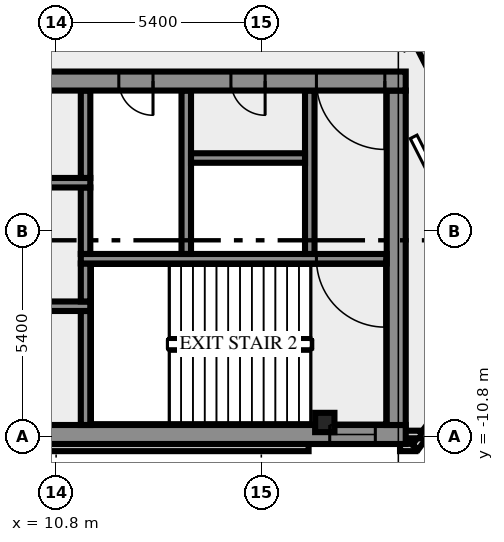
"""IFC4 building model, lengths in metres.
Left out: names, types, materials, properties, quantities, classifications, styles, units other than length and angle.
Written with IfcOpenShell. Run it as: python <this file> out.ifc"""

import sys

from ifc_helpers import new_model, si_unit, direction, frame, frame_2d, origin, origin_2d, place, context, subcontext, project, spatial, rectangle, hollow_rectangle, extrude, element, fill, save


model = new_model("IFC4")
c1 = context("Model", 3, precision=1e-05, world=origin(), true_north=direction((0.0, 1.0)))
c2 = subcontext(c1, "Body", "Model", "MODEL_VIEW")
j1 = project(units=[si_unit("LENGTHUNIT", "METRE"), si_unit("PLANEANGLEUNIT", "RADIAN")], contexts=[c1])
p1 = place(None, origin())
s1 = spatial("IfcSite", under=j1, at=p1, CompositionType="ELEMENT")
p2 = place(p1, origin())
s2 = spatial("IfcBuilding", under=s1, at=p2, CompositionType="ELEMENT")
p3 = place(p2, frame((0.0, 0.0, 355.0)))
s3 = spatial("IfcBuildingStorey", under=s2, at=p3, CompositionType="ELEMENT", Elevation=355.0)
p4 = place(p3, frame((17.87, -10.434, 0.0), z_axis=(0.0, 0.0, 1.0), x_axis=(1.0, 0.0, 0.0)))
e1 = element("IfcColumn", 1, at=p4, inside=s3, PredefinedType="COLUMN", context=c2, shape_type="SweptSolid", body=[
    extrude(hollow_rectangle(XDim=0.508, YDim=0.508, WallThickness=0.016, at=origin_2d()), origin(), (0.0, 0.0, 1.0), 7.55),
])
p5 = place(p3, frame((-17.444, -11.088, 0.0), z_axis=(0.0, 0.0, 1.0), x_axis=(1.0, 0.0, 0.0)))
e2 = element("IfcWall", 2, at=p5, inside=s3, PredefinedType="SOLIDWALL", context=c2, shape_type="SweptSolid", body=[
    extrude(rectangle(XDim=34.888, YDim=0.2, at=frame_2d((17.444, 0.0))), origin(), (0.0, 0.0, 1.0), 7.55),
])
p6 = place(p3, frame((19.85, -11.088, 0.0), z_axis=(0.0, 0.0, 1.0), x_axis=(1.0, 0.0, 0.0)))
e3 = element("IfcWall", 3, at=p6, inside=s3, PredefinedType="SOLIDWALL", context=c2, shape_type="SweptSolid", body=[
    extrude(rectangle(XDim=0.406, YDim=0.2, at=frame_2d((0.203, 0.0))), origin(), (0.0, 0.0, 1.0), 7.55),
])
p7 = place(p3, frame((20.253, -11.083, 0.0), z_axis=(0.0, 0.0, 1.0), x_axis=(0.587766567315, 0.809030569476, 0.0)))
e4 = element("IfcWall", 4, at=p7, inside=s3, PredefinedType="SOLIDWALL", context=c2, shape_type="SweptSolid", body=[
    extrude(rectangle(XDim=2.688, YDim=0.2, at=frame_2d((1.344, 0.0))), origin(), (0.0, 0.0, 1.0), 7.55),
])
p8 = place(p3, frame((20.244, -0.258, 0.0), z_axis=(0.0, 0.0, 1.0), x_axis=(0.453964632037, -0.891019703968, 0.0)))
e5 = element("IfcWall", 5, at=p8, inside=s3, PredefinedType="SOLIDWALL", context=c2, shape_type="SweptSolid", body=[
    extrude(rectangle(XDim=2.354, YDim=0.2, at=frame_2d((1.177, 0.0))), origin(), (0.0, 0.0, 1.0), 7.55),
])
p9 = place(p8, frame((0.843, 0.0, 0.0)))
e6 = element("IfcOpeningElement", 6, at=p9, cuts=e5, PredefinedType="OPENING", context=c2, shape_type="SweptSolid", body=[
    extrude(rectangle(XDim=0.9, YDim=2.1, at=frame_2d((0.45, 1.05))), frame((0.0, 0.11, 0.0), z_axis=(0.0, -1.0, 0.0), x_axis=(1.0, 0.0, 0.0)), (0.0, 0.0, 1.0), 0.22),
])
p10 = place(p3, frame((19.98, -10.75, 0.0), z_axis=(0.0, 0.0, 1.0), x_axis=(1.0, 0.0, 0.0)))
e7 = element("IfcWall", 7, at=p10, inside=s3, PredefinedType="SOLIDWALL", context=c2, shape_type="SweptSolid", body=[
    extrude(rectangle(XDim=0.417, YDim=0.2, at=frame_2d((0.208, 0.0))), origin(), (0.0, 0.0, 1.0), 7.55),
])
p11 = place(p3, frame((-20.0, -10.75, 0.0), z_axis=(0.0, 0.0, 1.0), x_axis=(1.0, 0.0, 0.0)))
e8 = element("IfcWall", 8, at=p11, inside=s3, PredefinedType="SHEAR", context=c2, shape_type="SweptSolid", body=[
    extrude(rectangle(XDim=40.0, YDim=0.5, at=frame_2d((20.0, 0.0))), origin(), (0.0, 0.0, 1.0), 7.55),
])
p12 = place(p11, frame((0.8, 0.0, 1.0)))
e9 = element("IfcOpeningElement", 9, at=p12, cuts=e8, PredefinedType="OPENING", context=c2, shape_type="SweptSolid", body=[
    extrude(rectangle(XDim=1.2, YDim=1.2, at=frame_2d((0.6, 0.6))), frame((0.0, 0.26, 0.0), z_axis=(0.0, -1.0, 0.0), x_axis=(1.0, 0.0, 0.0)), (0.0, 0.0, 1.0), 0.52),
])
p13 = place(p11, frame((38.0, 0.0, 1.0)))
e10 = element("IfcOpeningElement", 10, at=p13, cuts=e8, PredefinedType="OPENING", context=c2, shape_type="SweptSolid", body=[
    extrude(rectangle(XDim=1.2, YDim=1.2, at=frame_2d((0.6, 0.6))), frame((0.0, 0.26, 0.0), z_axis=(0.0, -1.0, 0.0), x_axis=(1.0, 0.0, 0.0)), (0.0, 0.0, 1.0), 0.52),
])
p14 = place(p3, frame((11.575, -10.5, 0.0), z_axis=(0.0, 0.0, 1.0), x_axis=(0.0, 1.0, 0.0)))
e11 = element("IfcWall", 11, at=p14, inside=s3, PredefinedType="SHEAR", context=c2, shape_type="SweptSolid", body=[
    extrude(rectangle(XDim=3.0, YDim=0.25, at=frame_2d((1.5, 0.0))), origin(), (0.0, 0.0, 1.0), 7.55),
])
p15 = place(p3, frame((19.75, -10.5, 0.0), z_axis=(0.0, 0.0, 1.0), x_axis=(0.0, 1.0, 0.0)))
e12 = element("IfcWall", 12, at=p15, inside=s3, PredefinedType="SHEAR", context=c2, shape_type="SweptSolid", body=[
    extrude(rectangle(XDim=8.8, YDim=0.5, at=frame_2d((4.4, 0.0))), origin(), (0.0, 0.0, 1.0), 7.55),
])
p16 = place(p3, frame((11.7, -7.375, 0.0), z_axis=(0.0, 0.0, 1.0), x_axis=(-1.0, 0.0, 0.0)))
e13 = element("IfcWall", 13, at=p16, inside=s3, PredefinedType="SHEAR", context=c2, shape_type="SweptSolid", body=[
    extrude(rectangle(XDim=23.4, YDim=0.25, at=frame_2d((11.7, 0.0))), origin(), (0.0, 0.0, 1.0), 7.55),
])
p17 = place(p16, frame((14.2, 0.0, 0.0)))
e14 = element("IfcOpeningElement", 14, at=p17, cuts=e13, PredefinedType="OPENING", context=c2, shape_type="SweptSolid", body=[
    extrude(rectangle(XDim=0.9, YDim=2.1, at=frame_2d((0.45, 1.05))), frame((0.0, 0.135, 0.0), z_axis=(0.0, -1.0, 0.0), x_axis=(1.0, 0.0, 0.0)), (0.0, 0.0, 1.0), 0.27),
])
p18 = place(p16, frame((12.35, 0.0, 0.0)))
e15 = element("IfcOpeningElement", 15, at=p18, cuts=e13, PredefinedType="OPENING", context=c2, shape_type="SweptSolid", body=[
    extrude(rectangle(XDim=0.9, YDim=2.1, at=frame_2d((0.45, 1.05))), frame((0.0, 0.135, 0.0), z_axis=(0.0, -1.0, 0.0), x_axis=(1.0, 0.0, 0.0)), (0.0, 0.0, 1.0), 0.27),
])
p19 = place(p16, frame((10.65, 0.0, 0.0)))
e16 = element("IfcOpeningElement", 16, at=p19, cuts=e13, PredefinedType="OPENING", context=c2, shape_type="SweptSolid", body=[
    extrude(rectangle(XDim=0.9, YDim=2.1, at=frame_2d((0.45, 1.05))), frame((0.0, 0.135, 0.0), z_axis=(0.0, -1.0, 0.0), x_axis=(1.0, 0.0, 0.0)), (0.0, 0.0, 1.0), 0.27),
])
p20 = place(p16, frame((7.6, 0.0, 0.0)))
e17 = element("IfcOpeningElement", 17, at=p20, cuts=e13, PredefinedType="OPENING", context=c2, shape_type="SweptSolid", body=[
    extrude(rectangle(XDim=0.9, YDim=2.1, at=frame_2d((0.45, 1.05))), frame((0.0, 0.135, 0.0), z_axis=(0.0, -1.0, 0.0), x_axis=(1.0, 0.0, 0.0)), (0.0, 0.0, 1.0), 0.27),
])
p21 = place(p16, frame((2.338, 0.0, 0.0)))
e18 = element("IfcOpeningElement", 18, at=p21, cuts=e13, PredefinedType="OPENING", context=c2, shape_type="SweptSolid", body=[
    extrude(rectangle(XDim=0.9, YDim=2.1, at=frame_2d((0.45, 1.05))), frame((0.0, 0.135, 0.0), z_axis=(0.0, -1.0, 0.0), x_axis=(1.0, 0.0, 0.0)), (0.0, 0.0, 1.0), 0.27),
])
p22 = place(p3, frame((11.575, -7.25, 0.0), z_axis=(0.0, 0.0, 1.0), x_axis=(0.0, 1.0, 0.0)))
e19 = element("IfcWall", 19, at=p22, inside=s3, PredefinedType="SHEAR", context=c2, shape_type="SweptSolid", body=[
    extrude(rectangle(XDim=1.0, YDim=0.25, at=frame_2d((0.5, 0.0))), origin(), (0.0, 0.0, 1.0), 7.55),
])
p23 = place(p3, frame((19.5, -6.125, 0.0), z_axis=(0.0, 0.0, 1.0), x_axis=(-1.0, 0.0, 0.0)))
e20 = element("IfcWall", 20, at=p23, inside=s3, PredefinedType="SHEAR", context=c2, shape_type="SweptSolid", body=[
    extrude(rectangle(XDim=8.05, YDim=0.25, at=frame_2d((4.025, 0.0))), origin(), (0.0, 0.0, 1.0), 7.55),
])
p24 = place(p23, frame((0.05, 0.0, 0.0)))
e21 = element("IfcOpeningElement", 21, at=p24, cuts=e20, PredefinedType="OPENING", context=c2, shape_type="SweptSolid", body=[
    extrude(rectangle(XDim=1.8, YDim=2.1, at=frame_2d((0.9, 1.05))), frame((0.0, 0.135, 0.0), z_axis=(0.0, -1.0, 0.0), x_axis=(1.0, 0.0, 0.0)), (0.0, 0.0, 1.0), 0.27),
])
p25 = place(p3, frame((11.575, -6.0, 0.0), z_axis=(0.0, 0.0, 1.0), x_axis=(0.0, 1.0, 0.0)))
e22 = element("IfcWall", 22, at=p25, inside=s3, PredefinedType="SHEAR", context=c2, shape_type="SweptSolid", body=[
    extrude(rectangle(XDim=1.75, YDim=0.25, at=frame_2d((0.875, 0.0))), origin(), (0.0, 0.0, 1.0), 7.55),
])
for number, where, z_axis, x_axis in (
    (23, (14.225, -6.0, 0.0), (0.0, 0.0, 1.0), (0.0, 1.0, 0.0)),
    (24, (17.475, -6.0, 0.0), (0.0, 0.0, 1.0), (0.0, 1.0, 0.0)),
):
    element("IfcWall", number, at=place(p3, frame(where, z_axis=z_axis, x_axis=x_axis)), inside=s3, PredefinedType="SHEAR", context=c2, shape_type="SweptSolid", body=[
        extrude(rectangle(XDim=4.3, YDim=0.25, at=frame_2d((2.15, 0.0))), origin(), (0.0, 0.0, 1.0), 7.55),
    ])
p26 = place(p3, frame((1.45, -4.125, 0.0), z_axis=(0.0, 0.0, 1.0), x_axis=(1.0, 0.0, 0.0)))
e25 = element("IfcWall", 25, at=p26, inside=s3, PredefinedType="SHEAR", context=c2, shape_type="SweptSolid", body=[
    extrude(rectangle(XDim=10.25, YDim=0.25, at=frame_2d((5.125, 0.0))), origin(), (0.0, 0.0, 1.0), 7.55),
])
p27 = place(p26, frame((0.7, 0.0, 0.0)))
e26 = element("IfcOpeningElement", 26, at=p27, cuts=e25, PredefinedType="OPENING", context=c2, shape_type="SweptSolid", body=[
    extrude(rectangle(XDim=1.3, YDim=2.1, at=frame_2d((0.65, 1.05))), frame((0.0, 0.135, 0.0), z_axis=(0.0, -1.0, 0.0), x_axis=(1.0, 0.0, 0.0)), (0.0, 0.0, 1.0), 0.27),
])
p28 = place(p3, frame((11.575, -4.0, 0.0), z_axis=(0.0, 0.0, 1.0), x_axis=(0.0, 1.0, 0.0)))
e27 = element("IfcWall", 27, at=p28, inside=s3, PredefinedType="SHEAR", context=c2, shape_type="SweptSolid", body=[
    extrude(rectangle(XDim=2.3, YDim=0.25, at=frame_2d((1.15, 0.0))), origin(), (0.0, 0.0, 1.0), 7.55),
])
p29 = place(p3, frame((14.35, -3.475, 0.0), z_axis=(0.0, 0.0, 1.0), x_axis=(1.0, 0.0, 0.0)))
e28 = element("IfcWall", 28, at=p29, inside=s3, PredefinedType="SHEAR", context=c2, shape_type="SweptSolid", body=[
    extrude(rectangle(XDim=3.0, YDim=0.25, at=frame_2d((1.5, 0.0))), origin(), (0.0, 0.0, 1.0), 7.55),
])
p30 = place(p3, frame((20.0, -1.45, 0.0), z_axis=(0.0, 0.0, 1.0), x_axis=(-1.0, 0.0, 0.0)))
e29 = element("IfcWall", 29, at=p30, inside=s3, PredefinedType="SHEAR", context=c2, shape_type="SweptSolid", body=[
    extrude(rectangle(XDim=40.0, YDim=0.5, at=frame_2d((20.0, 0.0))), origin(), (0.0, 0.0, 1.0), 7.55),
])
p31 = place(p30, frame((37.65, 0.0, 0.0)))
e30 = element("IfcOpeningElement", 30, at=p31, cuts=e29, PredefinedType="OPENING", context=c2, shape_type="SweptSolid", body=[
    extrude(rectangle(XDim=1.8, YDim=2.1, at=frame_2d((0.9, 1.05))), frame((0.0, 0.26, 0.0), z_axis=(0.0, -1.0, 0.0), x_axis=(1.0, 0.0, 0.0)), (0.0, 0.0, 1.0), 0.52),
])
p32 = place(p30, frame((36.238, 0.0, 0.0)))
e31 = element("IfcOpeningElement", 31, at=p32, cuts=e29, PredefinedType="OPENING", context=c2, shape_type="SweptSolid", body=[
    extrude(rectangle(XDim=0.8, YDim=2.1, at=frame_2d((0.4, 1.05))), frame((0.0, 0.26, 0.0), z_axis=(0.0, -1.0, 0.0), x_axis=(1.0, 0.0, 0.0)), (0.0, 0.0, 1.0), 0.52),
])
p33 = place(p30, frame((34.663, 0.0, 0.0)))
e32 = element("IfcOpeningElement", 32, at=p33, cuts=e29, PredefinedType="OPENING", context=c2, shape_type="SweptSolid", body=[
    extrude(rectangle(XDim=0.8, YDim=2.1, at=frame_2d((0.4, 1.05))), frame((0.0, 0.26, 0.0), z_axis=(0.0, -1.0, 0.0), x_axis=(1.0, 0.0, 0.0)), (0.0, 0.0, 1.0), 0.52),
])
p34 = place(p30, frame((32.45, 0.0, 0.0)))
e33 = element("IfcOpeningElement", 33, at=p34, cuts=e29, PredefinedType="OPENING", context=c2, shape_type="SweptSolid", body=[
    extrude(rectangle(XDim=0.9, YDim=2.1, at=frame_2d((0.45, 1.05))), frame((0.0, 0.26, 0.0), z_axis=(0.0, -1.0, 0.0), x_axis=(1.0, 0.0, 0.0)), (0.0, 0.0, 1.0), 0.52),
])
p35 = place(p30, frame((20.25, 0.0, 0.0)))
e34 = element("IfcOpeningElement", 34, at=p35, cuts=e29, PredefinedType="OPENING", context=c2, shape_type="SweptSolid", body=[
    extrude(rectangle(XDim=2.0, YDim=2.1, at=frame_2d((1.0, 1.05))), frame((0.0, 0.26, 0.0), z_axis=(0.0, -1.0, 0.0), x_axis=(1.0, 0.0, 0.0)), (0.0, 0.0, 1.0), 0.52),
])
p36 = place(p30, frame((14.413, 0.0, 0.0)))
e35 = element("IfcOpeningElement", 35, at=p36, cuts=e29, PredefinedType="OPENING", context=c2, shape_type="SweptSolid", body=[
    extrude(rectangle(XDim=0.9, YDim=2.1, at=frame_2d((0.45, 1.05))), frame((0.0, 0.26, 0.0), z_axis=(0.0, -1.0, 0.0), x_axis=(1.0, 0.0, 0.0)), (0.0, 0.0, 1.0), 0.52),
])
p37 = place(p30, frame((12.05, 0.0, 0.0)))
e36 = element("IfcOpeningElement", 36, at=p37, cuts=e29, PredefinedType="OPENING", context=c2, shape_type="SweptSolid", body=[
    extrude(rectangle(XDim=0.9, YDim=2.1, at=frame_2d((0.45, 1.05))), frame((0.0, 0.26, 0.0), z_axis=(0.0, -1.0, 0.0), x_axis=(1.0, 0.0, 0.0)), (0.0, 0.0, 1.0), 0.52),
])
p38 = place(p30, frame((9.387, 0.0, 0.0)))
e37 = element("IfcOpeningElement", 37, at=p38, cuts=e29, PredefinedType="OPENING", context=c2, shape_type="SweptSolid", body=[
    extrude(rectangle(XDim=0.9, YDim=2.1, at=frame_2d((0.45, 1.05))), frame((0.0, 0.26, 0.0), z_axis=(0.0, -1.0, 0.0), x_axis=(1.0, 0.0, 0.0)), (0.0, 0.0, 1.0), 0.52),
])
p39 = place(p30, frame((6.65, 0.0, 0.0)))
e38 = element("IfcOpeningElement", 38, at=p39, cuts=e29, PredefinedType="OPENING", context=c2, shape_type="SweptSolid", body=[
    extrude(rectangle(XDim=0.9, YDim=2.1, at=frame_2d((0.45, 1.05))), frame((0.0, 0.26, 0.0), z_axis=(0.0, -1.0, 0.0), x_axis=(1.0, 0.0, 0.0)), (0.0, 0.0, 1.0), 0.52),
])
p40 = place(p30, frame((3.7, 0.0, 0.0)))
e39 = element("IfcOpeningElement", 39, at=p40, cuts=e29, PredefinedType="OPENING", context=c2, shape_type="SweptSolid", body=[
    extrude(rectangle(XDim=0.9, YDim=2.1, at=frame_2d((0.45, 1.05))), frame((0.0, 0.26, 0.0), z_axis=(0.0, -1.0, 0.0), x_axis=(1.0, 0.0, 0.0)), (0.0, 0.0, 1.0), 0.52),
])
p41 = place(p30, frame((0.55, 0.0, 0.0)))
e40 = element("IfcOpeningElement", 40, at=p41, cuts=e29, PredefinedType="OPENING", context=c2, shape_type="SweptSolid", body=[
    extrude(rectangle(XDim=1.8, YDim=2.1, at=frame_2d((0.9, 1.05))), frame((0.0, 0.26, 0.0), z_axis=(0.0, -1.0, 0.0), x_axis=(1.0, 0.0, 0.0)), (0.0, 0.0, 1.0), 0.52),
])
p42 = place(p13, origin())
e41 = element("IfcWindow", 41, at=p42, inside=s3, PartitioningType="SINGLE_PANEL", PredefinedType="WINDOW", context=c2, shape_type="SweptSolid", body=[
    extrude(rectangle(XDim=1.2, YDim=1.2, at=frame_2d((0.6, 0.6))), frame((0.0, 0.03, 0.0), z_axis=(0.0, -1.0, 0.0), x_axis=(1.0, 0.0, 0.0)), (0.0, 0.0, 1.0), 0.06),
])
fill(e10, e41)
p43 = place(p24, origin())
e42 = element("IfcDoor", 42, at=p43, inside=s3, OperationType="DOUBLE_DOOR_SINGLE_SWING", PredefinedType="DOOR", context=c2, shape_type="SweptSolid", body=[
    extrude(rectangle(XDim=1.8, YDim=2.1, at=frame_2d((0.9, 1.05))), frame((0.0, 0.025, 0.0), z_axis=(0.0, -1.0, 0.0), x_axis=(1.0, 0.0, 0.0)), (0.0, 0.0, 1.0), 0.05),
])
fill(e21, e42)
p44 = place(p39, origin())
e43 = element("IfcDoor", 43, at=p44, inside=s3, OperationType="SINGLE_SWING_LEFT", PredefinedType="DOOR", context=c2, shape_type="SweptSolid", body=[
    extrude(rectangle(XDim=0.9, YDim=2.1, at=frame_2d((0.45, 1.05))), frame((0.0, 0.025, 0.0), z_axis=(0.0, -1.0, 0.0), x_axis=(1.0, 0.0, 0.0)), (0.0, 0.0, 1.0), 0.05),
])
fill(e38, e43)
p45 = place(p40, origin())
e44 = element("IfcDoor", 44, at=p45, inside=s3, OperationType="SINGLE_SWING_LEFT", PredefinedType="DOOR", context=c2, shape_type="SweptSolid", body=[
    extrude(rectangle(XDim=0.9, YDim=2.1, at=frame_2d((0.45, 1.05))), frame((0.0, 0.025, 0.0), z_axis=(0.0, -1.0, 0.0), x_axis=(1.0, 0.0, 0.0)), (0.0, 0.0, 1.0), 0.05),
])
fill(e39, e44)
p46 = place(p41, origin())
e45 = element("IfcDoor", 45, at=p46, inside=s3, OperationType="DOUBLE_DOOR_SINGLE_SWING", PredefinedType="DOOR", context=c2, shape_type="SweptSolid", body=[
    extrude(rectangle(XDim=1.8, YDim=2.1, at=frame_2d((0.9, 1.05))), frame((0.0, 0.025, 0.0), z_axis=(0.0, -1.0, 0.0), x_axis=(1.0, 0.0, 0.0)), (0.0, 0.0, 1.0), 0.05),
])
fill(e40, e45)
save(model, sys.argv[1])
